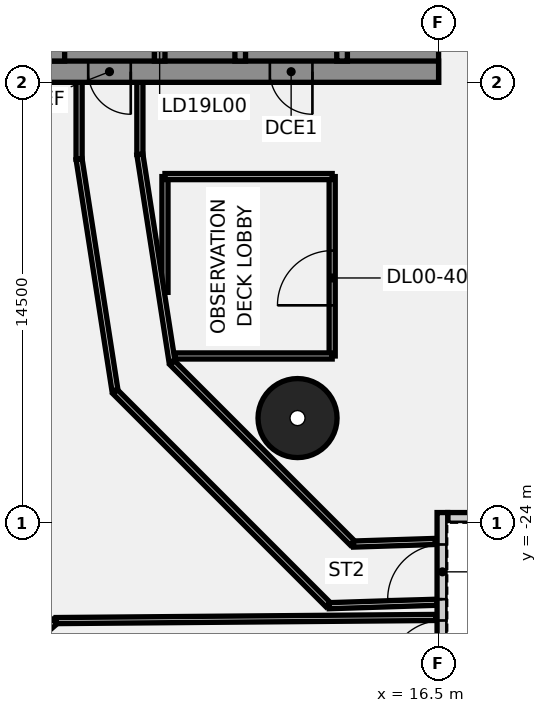
"""IFC4 building model, lengths in metres.
Left out: names, types, materials, properties, quantities, classifications, styles, units other than length and angle.
Written with IfcOpenShell. Run it as: python <this file> out.ifc"""

import sys

from ifc_helpers import new_model, si_unit, direction, frame, frame_2d, origin, origin_2d, place, context, subcontext, project, spatial, polyline, rectangle, circle, outline, extrude, element, fill, save


model = new_model("IFC4")
c1 = context("Model", 3, precision=1e-05, world=origin(), true_north=direction((0.0, 1.0)))
c2 = subcontext(c1, "Body", "Model", "MODEL_VIEW")
j1 = project(units=[si_unit("LENGTHUNIT", "METRE"), si_unit("PLANEANGLEUNIT", "RADIAN")], contexts=[c1])
p1 = place(None, origin())
s1 = spatial("IfcSite", under=j1, at=p1, CompositionType="ELEMENT")
p2 = place(p1, origin())
s2 = spatial("IfcBuilding", under=s1, at=p2, CompositionType="ELEMENT")
p3 = place(p2, origin())
s3 = spatial("IfcBuildingStorey", under=s2, at=p3, CompositionType="ELEMENT", Elevation=0.0)
p4 = place(p3, frame((11.86, -20.543, -0.55), z_axis=(0.0, 0.0, 1.0), x_axis=(1.0, 0.0, 0.0)))
e1 = element("IfcColumn", 1, at=p4, inside=s3, PredefinedType="COLUMN", context=c2, shape_type="SweptSolid", body=[
    extrude(circle(Radius=1.3, at=origin_2d()), origin(), (0.0, 0.0, 1.0), 9.05),
])
p5 = place(p3, frame((13.0, -18.5, 0.0), z_axis=(0.0, 0.0, 1.0), x_axis=(0.0, 1.0, 0.0)))
e2 = element("IfcWall", 2, at=p5, inside=s3, PredefinedType="PARTITIONING", context=c2, shape_type="SweptSolid", body=[
    extrude(rectangle(XDim=5.9, YDim=0.2, at=frame_2d((2.95, 0.0))), origin(), (0.0, 0.0, 1.0), 8.5),
])
p6 = place(p5, frame((1.665, 0.0, 0.0)))
e3 = element("IfcOpeningElement", 3, at=p6, cuts=e2, PredefinedType="OPENING", context=c2, shape_type="SweptSolid", body=[
    extrude(rectangle(XDim=1.8, YDim=2.1, at=frame_2d((0.9, 1.05))), frame((0.0, 0.11, 0.0), z_axis=(0.0, -1.0, 0.0), x_axis=(1.0, 0.0, 0.0)), (0.0, 0.0, 1.0), 0.22),
])
p7 = place(p3, frame((7.825, -18.5, 0.0), z_axis=(0.0, 0.0, 1.0), x_axis=(1.0, 0.0, 0.0)))
e4 = element("IfcWall", 4, at=p7, inside=s3, PredefinedType="PARTITIONING", context=c2, shape_type="SweptSolid", body=[
    extrude(rectangle(XDim=5.175, YDim=0.2, at=frame_2d((2.588, 0.0))), origin(), (0.0, 0.0, 1.0), 8.5),
])
p8 = place(p3, frame((7.5, -16.407, 0.0), z_axis=(0.0, 0.0, 1.0), x_axis=(0.0, 1.0, 0.0)))
e5 = element("IfcWall", 5, at=p8, inside=s3, PredefinedType="PARTITIONING", context=c2, shape_type="SweptSolid", body=[
    extrude(rectangle(XDim=3.807, YDim=0.2, at=frame_2d((1.903, 0.0))), origin(), (0.0, 0.0, 1.0), 8.5),
])
p9 = place(p3, frame((7.5, -12.6, 0.0), z_axis=(0.0, 0.0, 1.0), x_axis=(1.0, 0.0, 0.0)))
e6 = element("IfcWall", 6, at=p9, inside=s3, PredefinedType="PARTITIONING", context=c2, shape_type="SweptSolid", body=[
    extrude(rectangle(XDim=5.5, YDim=0.2, at=frame_2d((2.75, 0.0))), origin(), (0.0, 0.0, 1.0), 8.5),
])
p10 = place(p3, frame((1.124, -29.65, 0.0), z_axis=(0.0, 0.0, 1.0), x_axis=(0.752593197415, 0.658485747154, 0.0)))
e7 = element("IfcWall", 7, at=p10, inside=s3, PredefinedType="PARTITIONING", context=c2, shape_type="SweptSolid", body=[
    extrude(rectangle(XDim=3.666, YDim=0.2, at=frame_2d((1.833, 0.0))), origin(), (0.0, 0.0, 1.0), 8.5),
])
p11 = place(p3, frame((3.921, -27.203, 0.0), z_axis=(0.0, 0.0, 1.0), x_axis=(0.999965985762, 0.008247867521, 0.0)))
e8 = element("IfcWall", 8, at=p11, inside=s3, PredefinedType="PARTITIONING", context=c2, shape_type="SweptSolid", body=[
    extrude(rectangle(XDim=12.491, YDim=0.2, at=frame_2d((6.246, 0.0))), origin(), (0.0, 0.0, 1.0), 8.5),
])
p12 = place(p3, frame((6.675, -9.5, 0.0), z_axis=(0.0, 0.0, 1.0), x_axis=(0.0, -1.0, 0.0)))
e9 = element("IfcWall", 9, at=p12, inside=s3, PredefinedType="PARTITIONING", context=c2, shape_type="SweptSolid", body=[
    extrude(rectangle(XDim=2.373, YDim=0.2, at=frame_2d((1.187, 0.0))), origin(), (0.0, 0.0, 1.0), 8.5),
])
p13 = place(p3, frame((6.675, -11.873, 0.0), z_axis=(0.0, 0.0, 1.0), x_axis=(0.153333746866, -0.98817445933, 0.0)))
e10 = element("IfcWall", 10, at=p13, inside=s3, PredefinedType="PARTITIONING", context=c2, shape_type="SweptSolid", body=[
    extrude(rectangle(XDim=6.883, YDim=0.2, at=frame_2d((3.441, 0.0))), origin(), (0.0, 0.0, 1.0), 8.5),
])
p14 = place(p3, frame((7.738, -18.724, 0.0), z_axis=(0.0, 0.0, 1.0), x_axis=(0.707121343443, -0.70709221863, 0.0)))
e11 = element("IfcWall", 11, at=p14, inside=s3, PredefinedType="PARTITIONING", context=c2, shape_type="SweptSolid", body=[
    extrude(rectangle(XDim=8.383, YDim=0.2, at=frame_2d((4.191, 0.0))), origin(), (0.0, 0.0, 1.0), 8.5),
])
p15 = place(p3, frame((13.701, -24.687, 0.0), z_axis=(0.0, 0.0, 1.0), x_axis=(0.999488950114, 0.031966210289, 0.0)))
e12 = element("IfcWall", 12, at=p15, inside=s3, PredefinedType="PARTITIONING", context=c2, shape_type="SweptSolid", body=[
    extrude(rectangle(XDim=2.688, YDim=0.2, at=frame_2d((1.344, 0.0))), origin(), (0.0, 0.0, 1.0), 8.5),
])
p16 = place(p3, frame((4.675, -9.5, 0.0), z_axis=(0.0, 0.0, 1.0), x_axis=(0.0, -1.0, 0.0)))
e13 = element("IfcWall", 13, at=p16, inside=s3, PredefinedType="PARTITIONING", context=c2, shape_type="SweptSolid", body=[
    extrude(rectangle(XDim=2.527, YDim=0.2, at=frame_2d((1.264, 0.0))), origin(), (0.0, 0.0, 1.0), 8.5),
])
p17 = place(p3, frame((4.675, -12.027, 0.0), z_axis=(0.0, 0.0, 1.0), x_axis=(0.153330916217, -0.988174898554, 0.0)))
e14 = element("IfcWall", 14, at=p17, inside=s3, PredefinedType="PARTITIONING", context=c2, shape_type="SweptSolid", body=[
    extrude(rectangle(XDim=7.69, YDim=0.2, at=frame_2d((3.845, 0.0))), origin(), (0.0, 0.0, 1.0), 8.5),
])
p18 = place(p3, frame((5.862, -19.676, 0.0), z_axis=(0.0, 0.0, 1.0), x_axis=(0.707106781187, -0.707106781187, 0.0)))
e15 = element("IfcWall", 15, at=p18, inside=s3, PredefinedType="PARTITIONING", context=c2, shape_type="SweptSolid", body=[
    extrude(rectangle(XDim=9.902, YDim=0.2, at=frame_2d((4.951, 0.0))), origin(), (0.0, 0.0, 1.0), 8.5),
])
p19 = place(p3, frame((12.899, -26.713, 0.0), z_axis=(0.0, 0.0, 1.0), x_axis=(0.999487091524, 0.032024270122, 0.0)))
e16 = element("IfcWall", 16, at=p19, inside=s3, PredefinedType="PARTITIONING", context=c2, shape_type="SweptSolid", body=[
    extrude(rectangle(XDim=3.552, YDim=0.2, at=frame_2d((1.776, 0.0))), origin(), (0.0, 0.0, 1.0), 8.5),
])
p20 = place(p3, frame((16.8, -23.825, 0.0), z_axis=(0.0, 0.0, 1.0), x_axis=(1.0, 0.0, 0.0)))
e17 = element("IfcWall", 17, at=p20, inside=s3, PredefinedType="SOLIDWALL", context=c2, shape_type="SweptSolid", body=[
    extrude(rectangle(XDim=26.7, YDim=0.35, at=frame_2d((13.35, 0.0))), origin(), (0.0, 0.0, 1.0), 8.5),
])
p21 = place(p20, frame((15.25, 0.0, 1.0)))
e18 = element("IfcOpeningElement", 18, at=p21, cuts=e17, PredefinedType="OPENING", context=c2, shape_type="SweptSolid", body=[
    extrude(rectangle(XDim=2.4, YDim=1.8, at=frame_2d((1.2, 0.9))), frame((0.0, 0.185, 0.0), z_axis=(0.0, -1.0, 0.0), x_axis=(1.0, 0.0, 0.0)), (0.0, 0.0, 1.0), 0.37),
])
p22 = place(p3, frame((16.625, -42.35, 0.0), z_axis=(0.0, 0.0, 1.0), x_axis=(0.0, 1.0, 0.0)))
e19 = element("IfcWall", 19, at=p22, inside=s3, PredefinedType="SOLIDWALL", context=c2, shape_type="SweptSolid", body=[
    extrude(rectangle(XDim=18.7, YDim=0.35, at=frame_2d((9.35, 0.0))), origin(), (0.0, 0.0, 1.0), 8.5),
])
p23 = place(p22, frame((13.35, 0.0, 0.0)))
e20 = element("IfcOpeningElement", 20, at=p23, cuts=e19, PredefinedType="OPENING", context=c2, shape_type="SweptSolid", body=[
    extrude(rectangle(XDim=1.8, YDim=2.4, at=frame_2d((0.9, 1.2))), frame((0.0, 0.185, 0.0), z_axis=(0.0, -1.0, 0.0), x_axis=(1.0, 0.0, 0.0)), (0.0, 0.0, 1.0), 0.37),
])
p24 = place(p22, frame((15.85, 0.0, 0.0)))
e21 = element("IfcOpeningElement", 21, at=p24, cuts=e19, PredefinedType="OPENING", context=c2, shape_type="SweptSolid", body=[
    extrude(rectangle(XDim=1.8, YDim=2.4, at=frame_2d((0.9, 1.2))), frame((0.0, 0.185, 0.0), z_axis=(0.0, -1.0, 0.0), x_axis=(1.0, 0.0, 0.0)), (0.0, 0.0, 1.0), 0.37),
])
p25 = place(p22, frame((4.4, 0.0, 1.0)))
e22 = element("IfcOpeningElement", 22, at=p25, cuts=e19, PredefinedType="OPENING", context=c2, shape_type="SweptSolid", body=[
    extrude(rectangle(XDim=2.4, YDim=1.8, at=frame_2d((1.2, 0.9))), frame((0.0, 0.185, 0.0), z_axis=(0.0, -1.0, 0.0), x_axis=(1.0, 0.0, 0.0)), (0.0, 0.0, 1.0), 0.37),
])
p26 = place(p3, frame((16.5, -9.15, 0.0), z_axis=(0.0, 0.0, 1.0), x_axis=(-1.0, 0.0, 0.0)))
e23 = element("IfcWall", 23, at=p26, inside=s3, PredefinedType="SHEAR", context=c2, shape_type="SweptSolid", body=[
    extrude(rectangle(XDim=13.0, YDim=0.7, at=frame_2d((6.5, 0.0))), origin(), (0.0, 0.0, 1.0), 8.5),
])
p27 = place(p26, frame((4.15, 0.0, 0.0)))
e24 = element("IfcOpeningElement", 24, at=p27, cuts=e23, PredefinedType="OPENING", context=c2, shape_type="SweptSolid", body=[
    extrude(rectangle(XDim=1.4, YDim=2.1, at=frame_2d((0.7, 1.05))), frame((0.0, 0.36, 0.0), z_axis=(0.0, -1.0, 0.0), x_axis=(1.0, 0.0, 0.0)), (0.0, 0.0, 1.0), 0.72),
])
p28 = place(p26, frame((10.125, 0.0, 0.0)))
e25 = element("IfcOpeningElement", 25, at=p28, cuts=e23, PredefinedType="OPENING", context=c2, shape_type="SweptSolid", body=[
    extrude(rectangle(XDim=1.4, YDim=2.1, at=frame_2d((0.7, 1.05))), frame((0.0, 0.36, 0.0), z_axis=(0.0, -1.0, 0.0), x_axis=(1.0, 0.0, 0.0)), (0.0, 0.0, 1.0), 0.72),
])
p29 = place(p3, origin())
e26 = element("IfcWall", 26, at=p29, inside=s3, PredefinedType="SHEAR", context=c2, shape_type="SweptSolid", body=[
    extrude(outline(polyline([(13.5, -8.8), (15.8, -8.8), (16.5, -8.8), (16.5, 8.8), (15.8, 8.8), (13.5, 8.8), (13.5, 8.125), (15.8, 8.125), (15.8, 5.625), (13.5, 5.625), (13.5, 5.375), (15.8, 5.375), (15.8, 2.875), (13.5, 2.875), (13.5, 2.625), (15.8, 2.625), (15.8, 0.125), (13.5, 0.125), (13.5, -0.125), (15.8, -0.125), (15.8, -2.625), (13.5, -2.625), (13.5, -2.875), (15.8, -2.875), (15.8, -5.375), (13.5, -5.375), (13.5, -5.625), (15.8, -5.625), (15.8, -8.125), (13.5, -8.125), (13.5, -8.8)])), origin(), (0.0, 0.0, 1.0), 8.5),
])
p30 = place(p3, origin())
e27 = element("IfcWall", 27, at=p30, inside=s3, PredefinedType="SHEAR", context=c2, shape_type="SweptSolid", body=[
    extrude(outline(polyline([(7.5, -8.125), (7.5, -8.8), (9.8, -8.8), (9.8, -8.125), (9.8, -5.625), (9.55, -5.625), (9.55, -8.125), (7.5, -8.125)])), origin(), (0.0, 0.0, 1.0), 8.5),
])
p31 = place(p3, frame((7.325, -8.8, 0.0), z_axis=(0.0, 0.0, 1.0), x_axis=(0.0, 1.0, 0.0)))
e28 = element("IfcWall", 28, at=p31, inside=s3, PredefinedType="SHEAR", context=c2, shape_type="SweptSolid", body=[
    extrude(rectangle(XDim=0.675, YDim=0.35, at=frame_2d((0.337, 0.0))), origin(), (0.0, 0.0, 1.0), 8.5),
])
p32 = place(p3, frame((13.325, -8.8, 0.0), z_axis=(0.0, 0.0, 1.0), x_axis=(0.0, 1.0, 0.0)))
e29 = element("IfcWall", 29, at=p32, inside=s3, PredefinedType="SHEAR", context=c2, shape_type="SweptSolid", body=[
    extrude(rectangle(XDim=17.6, YDim=0.35, at=frame_2d((8.8, 0.0))), origin(), (0.0, 0.0, 1.0), 8.5),
])
p33 = place(p32, frame((1.225, 0.0, 0.0)))
e30 = element("IfcOpeningElement", 30, at=p33, cuts=e29, PredefinedType="OPENING", context=c2, shape_type="SweptSolid", body=[
    extrude(rectangle(XDim=1.4, YDim=2.1, at=frame_2d((0.7, 1.05))), frame((0.0, 0.185, 0.0), z_axis=(0.0, -1.0, 0.0), x_axis=(1.0, 0.0, 0.0)), (0.0, 0.0, 1.0), 0.37),
])
p34 = place(p32, frame((4.125, 0.0, 0.0)))
e31 = element("IfcOpeningElement", 31, at=p34, cuts=e29, PredefinedType="OPENING", context=c2, shape_type="SweptSolid", body=[
    extrude(rectangle(XDim=1.1, YDim=2.1, at=frame_2d((0.55, 1.05))), frame((0.0, 0.185, 0.0), z_axis=(0.0, -1.0, 0.0), x_axis=(1.0, 0.0, 0.0)), (0.0, 0.0, 1.0), 0.37),
])
p35 = place(p32, frame((6.875, 0.0, 0.0)))
e32 = element("IfcOpeningElement", 32, at=p35, cuts=e29, PredefinedType="OPENING", context=c2, shape_type="SweptSolid", body=[
    extrude(rectangle(XDim=1.1, YDim=2.1, at=frame_2d((0.55, 1.05))), frame((0.0, 0.185, 0.0), z_axis=(0.0, -1.0, 0.0), x_axis=(1.0, 0.0, 0.0)), (0.0, 0.0, 1.0), 0.37),
])
p36 = place(p32, frame((9.625, 0.0, 0.0)))
e33 = element("IfcOpeningElement", 33, at=p36, cuts=e29, PredefinedType="OPENING", context=c2, shape_type="SweptSolid", body=[
    extrude(rectangle(XDim=1.1, YDim=2.1, at=frame_2d((0.55, 1.05))), frame((0.0, 0.185, 0.0), z_axis=(0.0, -1.0, 0.0), x_axis=(1.0, 0.0, 0.0)), (0.0, 0.0, 1.0), 0.37),
])
p37 = place(p32, frame((12.375, 0.0, 0.0)))
e34 = element("IfcOpeningElement", 34, at=p37, cuts=e29, PredefinedType="OPENING", context=c2, shape_type="SweptSolid", body=[
    extrude(rectangle(XDim=1.1, YDim=2.1, at=frame_2d((0.55, 1.05))), frame((0.0, 0.185, 0.0), z_axis=(0.0, -1.0, 0.0), x_axis=(1.0, 0.0, 0.0)), (0.0, 0.0, 1.0), 0.37),
])
p38 = place(p32, frame((15.075, 0.0, 0.0)))
e35 = element("IfcOpeningElement", 35, at=p38, cuts=e29, PredefinedType="OPENING", context=c2, shape_type="SweptSolid", body=[
    extrude(rectangle(XDim=1.2, YDim=2.1, at=frame_2d((0.6, 1.05))), frame((0.0, 0.185, 0.0), z_axis=(0.0, -1.0, 0.0), x_axis=(1.0, 0.0, 0.0)), (0.0, 0.0, 1.0), 0.37),
])
p39 = place(p3, frame((9.975, -8.8, 0.0), z_axis=(0.0, 0.0, 1.0), x_axis=(0.0, 1.0, 0.0)))
e36 = element("IfcWall", 36, at=p39, inside=s3, PredefinedType="SHEAR", context=c2, shape_type="SweptSolid", body=[
    extrude(rectangle(XDim=17.6, YDim=0.35, at=frame_2d((8.8, 0.0))), origin(), (0.0, 0.0, 1.0), 8.5),
])
p40 = place(p39, frame((4.075, 0.0, 0.0)))
e37 = element("IfcOpeningElement", 37, at=p40, cuts=e36, PredefinedType="OPENING", context=c2, shape_type="SweptSolid", body=[
    extrude(rectangle(XDim=1.2, YDim=2.1, at=frame_2d((0.6, 1.05))), frame((0.0, 0.185, 0.0), z_axis=(0.0, -1.0, 0.0), x_axis=(1.0, 0.0, 0.0)), (0.0, 0.0, 1.0), 0.37),
])
p41 = place(p39, frame((6.825, 0.0, 0.0)))
e38 = element("IfcOpeningElement", 38, at=p41, cuts=e36, PredefinedType="OPENING", context=c2, shape_type="SweptSolid", body=[
    extrude(rectangle(XDim=1.2, YDim=2.1, at=frame_2d((0.6, 1.05))), frame((0.0, 0.185, 0.0), z_axis=(0.0, -1.0, 0.0), x_axis=(1.0, 0.0, 0.0)), (0.0, 0.0, 1.0), 0.37),
])
p42 = place(p39, frame((9.625, 0.0, 0.0)))
e39 = element("IfcOpeningElement", 39, at=p42, cuts=e36, PredefinedType="OPENING", context=c2, shape_type="SweptSolid", body=[
    extrude(rectangle(XDim=1.1, YDim=2.1, at=frame_2d((0.55, 1.05))), frame((0.0, 0.185, 0.0), z_axis=(0.0, -1.0, 0.0), x_axis=(1.0, 0.0, 0.0)), (0.0, 0.0, 1.0), 0.37),
])
p43 = place(p3, frame((3.85, -8.8, 0.0), z_axis=(0.0, 0.0, 1.0), x_axis=(0.0, 1.0, 0.0)))
e40 = element("IfcWall", 40, at=p43, inside=s3, PredefinedType="SHEAR", context=c2, shape_type="SweptSolid", body=[
    extrude(rectangle(XDim=17.6, YDim=0.7, at=frame_2d((8.8, 0.0))), origin(), (0.0, 0.0, 1.0), 8.5),
])
p44 = place(p43, frame((1.15, 0.0, 0.0)))
e41 = element("IfcOpeningElement", 41, at=p44, cuts=e40, PredefinedType="OPENING", context=c2, shape_type="SweptSolid", body=[
    extrude(rectangle(XDim=1.8, YDim=2.1, at=frame_2d((0.9, 1.05))), frame((0.0, 0.36, 0.0), z_axis=(0.0, -1.0, 0.0), x_axis=(1.0, 0.0, 0.0)), (0.0, 0.0, 1.0), 0.72),
])
p45 = place(p43, frame((13.7, 0.0, 0.0)))
e42 = element("IfcOpeningElement", 42, at=p45, cuts=e40, PredefinedType="OPENING", context=c2, shape_type="SweptSolid", body=[
    extrude(rectangle(XDim=1.0, YDim=2.1, at=frame_2d((0.5, 1.05))), frame((0.0, 0.36, 0.0), z_axis=(0.0, -1.0, 0.0), x_axis=(1.0, 0.0, 0.0)), (0.0, 0.0, 1.0), 0.72),
])
p46 = place(p6, origin())
e43 = element("IfcDoor", 43, at=p46, inside=s3, OperationType="SINGLE_SWING_RIGHT", PredefinedType="DOOR", context=c2, shape_type="SweptSolid", body=[
    extrude(rectangle(XDim=1.8, YDim=2.1, at=frame_2d((0.9, 1.05))), frame((0.0, 0.025, 0.0), z_axis=(0.0, -1.0, 0.0), x_axis=(1.0, 0.0, 0.0)), (0.0, 0.0, 1.0), 0.05),
])
fill(e3, e43)
p47 = place(p23, frame((1.8, 0.0, 0.0), z_axis=(0.0, 0.0, 1.0), x_axis=(-1.0, 0.0, 0.0)))
e44 = element("IfcDoor", 44, at=p47, inside=s3, OperationType="SINGLE_SWING_LEFT", PredefinedType="DOOR", context=c2, shape_type="SweptSolid", body=[
    extrude(rectangle(XDim=1.8, YDim=2.4, at=frame_2d((0.9, 1.2))), frame((0.0, 0.025, 0.0), z_axis=(0.0, -1.0, 0.0), x_axis=(1.0, 0.0, 0.0)), (0.0, 0.0, 1.0), 0.05),
])
fill(e20, e44)
p48 = place(p24, frame((1.8, 0.0, 0.0), z_axis=(0.0, 0.0, 1.0), x_axis=(-1.0, 0.0, 0.0)))
e45 = element("IfcDoor", 45, at=p48, inside=s3, OperationType="SINGLE_SWING_LEFT", PredefinedType="DOOR", context=c2, shape_type="SweptSolid", body=[
    extrude(rectangle(XDim=1.8, YDim=2.4, at=frame_2d((0.9, 1.2))), frame((0.0, 0.025, 0.0), z_axis=(0.0, -1.0, 0.0), x_axis=(1.0, 0.0, 0.0)), (0.0, 0.0, 1.0), 0.05),
])
fill(e21, e45)
p49 = place(p27, origin())
e46 = element("IfcDoor", 46, at=p49, inside=s3, OperationType="SINGLE_SWING_LEFT", PredefinedType="DOOR", context=c2, shape_type="SweptSolid", body=[
    extrude(rectangle(XDim=1.4, YDim=2.1, at=frame_2d((0.7, 1.05))), frame((0.0, 0.025, 0.0), z_axis=(0.0, -1.0, 0.0), x_axis=(1.0, 0.0, 0.0)), (0.0, 0.0, 1.0), 0.05),
])
fill(e24, e46)
p50 = place(p28, origin())
e47 = element("IfcDoor", 47, at=p50, inside=s3, OperationType="SINGLE_SWING_LEFT", PredefinedType="DOOR", context=c2, shape_type="SweptSolid", body=[
    extrude(rectangle(XDim=1.4, YDim=2.1, at=frame_2d((0.7, 1.05))), frame((0.0, 0.025, 0.0), z_axis=(0.0, -1.0, 0.0), x_axis=(1.0, 0.0, 0.0)), (0.0, 0.0, 1.0), 0.05),
])
fill(e25, e47)
save(model, sys.argv[1])
